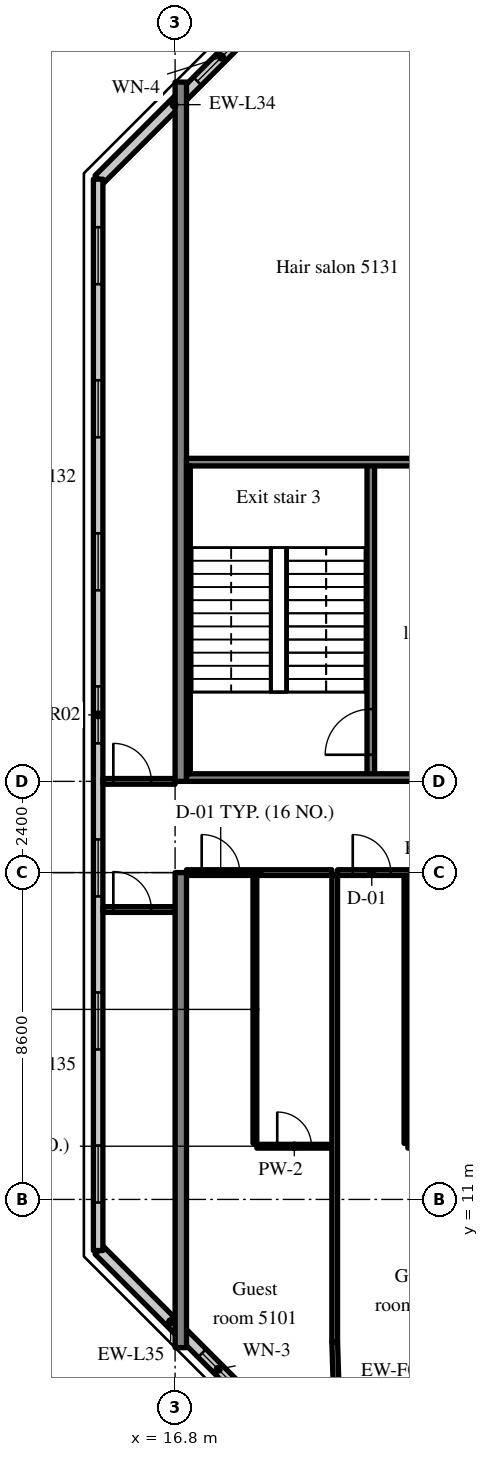
"""IFC4 building model, lengths in metres.
Left out: names, types, materials, properties, quantities, classifications, styles, units other than length and angle.
Written with IfcOpenShell. Run it as: python <this file> out.ifc"""

import sys

from ifc_helpers import new_model, si_unit, direction, frame, frame_2d, origin, place, context, subcontext, project, spatial, rectangle, extrude, source, transform, mapped, element, fill, save


model = new_model("IFC4")
c1 = context("Model", 3, precision=1e-05, world=origin(), true_north=direction((0.0, 1.0)))
c2 = subcontext(c1, "Body", "Model", "MODEL_VIEW")
j1 = project(units=[si_unit("LENGTHUNIT", "METRE"), si_unit("PLANEANGLEUNIT", "RADIAN")], contexts=[c1])
p1 = place(None, origin())
s1 = spatial("IfcSite", under=j1, at=p1, CompositionType="ELEMENT")
p2 = place(p1, origin())
s2 = spatial("IfcBuilding", under=s1, at=p2, CompositionType="ELEMENT")
p3 = place(p2, frame((0.0, 0.0, 214.0)))
s3 = spatial("IfcBuildingStorey", under=s2, at=p3, CompositionType="ELEMENT", Elevation=214.0)
m1 = source(origin(), c2, "Body", "SweptSolid", [
    extrude(rectangle(XDim=12.5, YDim=0.3, at=frame_2d((6.25, 0.0))), origin(), (0.0, 0.0, 1.0), 3.62),
])
p4 = place(p3, frame((16.95, 7.1, 0.0), z_axis=(0.0, 0.0, 1.0), x_axis=(0.0, 1.0, 0.0)))
e1 = element("IfcWall", 1, at=p4, inside=s3, PredefinedType="SHEAR", context=c2, shape_type="MappedRepresentation", body=[
    mapped(m1, transform((0.0, 0.0, 0.0), scale=1.0)),
])
m2 = source(origin(), c2, "Body", "SweptSolid", [
    extrude(rectangle(XDim=18.4, YDim=0.3, at=frame_2d((9.2, 0.0))), origin(), (0.0, 0.0, 1.0), 3.62),
])
p5 = place(p3, frame((16.95, 22.0, 0.0), z_axis=(0.0, 0.0, 1.0), x_axis=(0.0, 1.0, 0.0)))
e2 = element("IfcWall", 2, at=p5, inside=s3, PredefinedType="SHEAR", context=c2, shape_type="MappedRepresentation", body=[
    mapped(m2, transform((0.0, 0.0, 0.0), scale=1.0)),
])
m3 = source(origin(), c2, "Body", "SweptSolid", [
    extrude(rectangle(XDim=5.576, YDim=0.3, at=frame_2d((2.788, 0.0))), origin(), (0.0, 0.0, 1.0), 3.62),
])
p6 = place(p3, frame((18.743, 41.777, 0.0), z_axis=(0.0, 0.0, 1.0), x_axis=(-0.707106781187, -0.707106781187, 0.0)))
e3 = element("IfcWall", 3, at=p6, inside=s3, PredefinedType="SOLIDWALL", context=c2, shape_type="MappedRepresentation", body=[
    mapped(m3, transform((0.0, 0.0, 0.0), scale=1.0)),
])
m4 = source(origin(), c2, "Body", "SweptSolid", [
    extrude(rectangle(XDim=1.8, YDim=1.5, at=frame_2d((0.9, 0.75))), frame((0.0, 0.16, 0.0), z_axis=(0.0, -1.0, 0.0), x_axis=(1.0, 0.0, 0.0)), (0.0, 0.0, 1.0), 0.32),
])
p7 = place(p6, frame((0.118, 0.0, 0.9)))
e4 = element("IfcOpeningElement", 4, at=p7, cuts=e3, PredefinedType="OPENING", context=c2, shape_type="MappedRepresentation", body=[
    mapped(m4, transform((0.0, 0.0, 0.0), scale=1.0)),
])
m5 = source(origin(), c2, "Body", "SweptSolid", [
    extrude(rectangle(XDim=5.326, YDim=0.3, at=frame_2d((2.663, 0.0))), origin(), (0.0, 0.0, 1.0), 3.62),
])
p8 = place(p3, frame((14.8, 9.666, 0.0), z_axis=(0.0, 0.0, 1.0), x_axis=(0.707083859269, -0.707129702361, 0.0)))
e5 = element("IfcWall", 5, at=p8, inside=s3, PredefinedType="SOLIDWALL", context=c2, shape_type="MappedRepresentation", body=[
    mapped(m5, transform((0.0, 0.0, 0.0), scale=1.0)),
])
m6 = source(origin(), c2, "Body", "SweptSolid", [
    extrude(rectangle(XDim=1.2, YDim=1.5, at=frame_2d((0.6, 0.75))), frame((0.0, 0.16, 0.0), z_axis=(0.0, -1.0, 0.0), x_axis=(1.0, 0.0, 0.0)), (0.0, 0.0, 1.0), 0.32),
])
p9 = place(p8, frame((3.833, 0.0, 0.9)))
e6 = element("IfcOpeningElement", 6, at=p9, cuts=e5, PredefinedType="OPENING", context=c2, shape_type="MappedRepresentation", body=[
    mapped(m6, transform((0.0, 0.0, 0.0), scale=1.0)),
])
m7 = source(origin(), c2, "Body", "SweptSolid", [
    extrude(rectangle(XDim=28.189, YDim=0.25, at=frame_2d((14.095, 0.0))), origin(), (0.0, 0.0, 1.0), 3.62),
])
p10 = place(p3, frame((14.775, 37.845, 0.0), z_axis=(0.0, 0.0, 1.0), x_axis=(0.0, -1.0, 0.0)))
e7 = element("IfcWall", 7, at=p10, inside=s3, PredefinedType="SOLIDWALL", context=c2, shape_type="MappedRepresentation", body=[
    mapped(m7, transform((0.0, 0.0, 0.0), scale=1.0)),
])
m8 = source(origin(), c2, "Body", "SweptSolid", [
    extrude(rectangle(XDim=1.5, YDim=1.5, at=frame_2d((0.75, 0.75))), frame((0.0, 0.135, 0.0), z_axis=(0.0, -1.0, 0.0), x_axis=(1.0, 0.0, 0.0)), (0.0, 0.0, 1.0), 0.27),
])
p11 = place(p10, frame((1.263, 0.0, 0.9)))
e8 = element("IfcOpeningElement", 8, at=p11, cuts=e7, PredefinedType="OPENING", context=c2, shape_type="MappedRepresentation", body=[
    mapped(m8, transform((0.0, 0.0, 0.0), scale=1.0)),
])
p12 = place(p10, frame((5.291, 0.0, 0.9)))
e9 = element("IfcOpeningElement", 9, at=p12, cuts=e7, PredefinedType="OPENING", context=c2, shape_type="MappedRepresentation", body=[
    mapped(m8, transform((0.0, 0.0, 0.0), scale=1.0)),
])
p13 = place(p10, frame((9.318, 0.0, 0.9)))
e10 = element("IfcOpeningElement", 10, at=p13, cuts=e7, PredefinedType="OPENING", context=c2, shape_type="MappedRepresentation", body=[
    mapped(m8, transform((0.0, 0.0, 0.0), scale=1.0)),
])
p14 = place(p10, frame((13.345, 0.0, 0.9)))
e11 = element("IfcOpeningElement", 11, at=p14, cuts=e7, PredefinedType="OPENING", context=c2, shape_type="MappedRepresentation", body=[
    mapped(m8, transform((0.0, 0.0, 0.0), scale=1.0)),
])
p15 = place(p10, frame((17.372, 0.0, 0.9)))
e12 = element("IfcOpeningElement", 12, at=p15, cuts=e7, PredefinedType="OPENING", context=c2, shape_type="MappedRepresentation", body=[
    mapped(m8, transform((0.0, 0.0, 0.0), scale=1.0)),
])
p16 = place(p10, frame((21.399, 0.0, 0.9)))
e13 = element("IfcOpeningElement", 13, at=p16, cuts=e7, PredefinedType="OPENING", context=c2, shape_type="MappedRepresentation", body=[
    mapped(m8, transform((0.0, 0.0, 0.0), scale=1.0)),
])
p17 = place(p10, frame((25.426, 0.0, 0.9)))
e14 = element("IfcOpeningElement", 14, at=p17, cuts=e7, PredefinedType="OPENING", context=c2, shape_type="MappedRepresentation", body=[
    mapped(m8, transform((0.0, 0.0, 0.0), scale=1.0)),
])
m9 = source(origin(), c2, "Body", "SweptSolid", [
    extrude(rectangle(XDim=8.3, YDim=0.2, at=frame_2d((4.15, 0.0))), origin(), (0.0, 0.0, 1.0), 3.62),
])
p18 = place(p3, frame((21.95, 22.1, 0.0), z_axis=(0.0, 0.0, 1.0), x_axis=(0.0, 1.0, 0.0)))
e15 = element("IfcWall", 15, at=p18, inside=s3, PredefinedType="SOLIDWALL", context=c2, shape_type="MappedRepresentation", body=[
    mapped(m9, transform((0.0, 0.0, 0.0), scale=1.0)),
])
m10 = source(origin(), c2, "Body", "SweptSolid", [
    extrude(rectangle(XDim=1.2, YDim=2.1, at=frame_2d((0.6, 1.05))), frame((0.0, 0.11, 0.0), z_axis=(0.0, -1.0, 0.0), x_axis=(1.0, 0.0, 0.0)), (0.0, 0.0, 1.0), 0.22),
])
p19 = place(p18, frame((0.6, 0.0, 0.0)))
e16 = element("IfcOpeningElement", 16, at=p19, cuts=e15, PredefinedType="OPENING", context=c2, shape_type="MappedRepresentation", body=[
    mapped(m10, transform((0.0, 0.0, 0.0), scale=1.0)),
])
m11 = source(origin(), c2, "Body", "SweptSolid", [
    extrude(rectangle(XDim=8.1, YDim=0.2, at=frame_2d((4.05, 0.0))), origin(), (0.0, 0.0, 1.0), 3.62),
])
p20 = place(p3, frame((17.1, 22.1, 0.0), z_axis=(0.0, 0.0, 1.0), x_axis=(1.0, 0.0, 0.0)))
e17 = element("IfcWall", 17, at=p20, inside=s3, PredefinedType="SOLIDWALL", context=c2, shape_type="MappedRepresentation", body=[
    mapped(m11, transform((0.0, 0.0, 0.0), scale=1.0)),
])
p21 = place(p20, frame((5.9, 0.0, 0.0)))
e18 = element("IfcOpeningElement", 18, at=p21, cuts=e17, PredefinedType="OPENING", context=c2, shape_type="MappedRepresentation", body=[
    mapped(m10, transform((0.0, 0.0, 0.0), scale=1.0)),
])
p22 = place(p3, frame((17.1, 30.4, 0.0), z_axis=(0.0, 0.0, 1.0), x_axis=(1.0, 0.0, 0.0)))
e19 = element("IfcWall", 19, at=p22, inside=s3, PredefinedType="SOLIDWALL", context=c2, shape_type="MappedRepresentation", body=[
    mapped(m11, transform((0.0, 0.0, 0.0), scale=1.0)),
])
m12 = source(origin(), c2, "Body", "SweptSolid", [
    extrude(rectangle(XDim=1.0, YDim=2.1, at=frame_2d((0.5, 1.05))), frame((0.0, 0.11, 0.0), z_axis=(0.0, -1.0, 0.0), x_axis=(1.0, 0.0, 0.0)), (0.0, 0.0, 1.0), 0.22),
])
p23 = place(p22, frame((6.0, 0.0, 0.0)))
e20 = element("IfcOpeningElement", 20, at=p23, cuts=e19, PredefinedType="OPENING", context=c2, shape_type="MappedRepresentation", body=[
    mapped(m12, transform((0.0, 0.0, 0.0), scale=1.0)),
])
m13 = source(origin(), c2, "Body", "SweptSolid", [
    extrude(rectangle(XDim=8.1, YDim=0.1, at=frame_2d((4.05, 0.0))), origin(), (0.0, 0.0, 1.0), 3.62),
])
p24 = place(p3, frame((17.15, 22.2, 0.0), z_axis=(0.0, 0.0, 1.0), x_axis=(0.0, 1.0, 0.0)))
e21 = element("IfcWall", 21, at=p24, inside=s3, PredefinedType="SOLIDWALL", context=c2, shape_type="MappedRepresentation", body=[
    mapped(m13, transform((0.0, 0.0, 0.0), scale=1.0)),
])
m14 = source(origin(), c2, "Body", "SweptSolid", [
    extrude(rectangle(XDim=7.05, YDim=0.1, at=frame_2d((3.525, 0.0))), origin(), (0.0, 0.0, 1.0), 3.62),
])
p25 = place(p3, frame((18.9, 12.475, 0.0), z_axis=(0.0, 0.0, 1.0), x_axis=(0.0, 1.0, 0.0)))
e22 = element("IfcWall", 22, at=p25, inside=s3, PredefinedType="PARTITIONING", context=c2, shape_type="MappedRepresentation", body=[
    mapped(m14, transform((0.0, 0.0, 0.0), scale=1.0)),
])
m15 = source(origin(), c2, "Body", "SweptSolid", [
    extrude(rectangle(XDim=1.975, YDim=0.1, at=frame_2d((0.988, 0.0))), origin(), (0.0, 0.0, 1.0), 3.62),
])
p26 = place(p3, frame((18.95, 12.4, 0.0), z_axis=(0.0, 0.0, 1.0), x_axis=(1.0, 0.0, 0.0)))
e23 = element("IfcWall", 23, at=p26, inside=s3, PredefinedType="PARTITIONING", context=c2, shape_type="MappedRepresentation", body=[
    mapped(m15, transform((0.0, 0.0, 0.0), scale=1.0)),
])
m16 = source(origin(), c2, "Body", "SweptSolid", [
    extrude(rectangle(XDim=0.9, YDim=2.1, at=frame_2d((0.45, 1.05))), frame((0.0, 0.06, 0.0), z_axis=(0.0, -1.0, 0.0), x_axis=(1.0, 0.0, 0.0)), (0.0, 0.0, 1.0), 0.12),
])
p27 = place(p26, frame((0.538, 0.0, 0.0)))
e24 = element("IfcOpeningElement", 24, at=p27, cuts=e23, PredefinedType="OPENING", context=c2, shape_type="MappedRepresentation", body=[
    mapped(m16, transform((0.0, 0.0, 0.0), scale=1.0)),
])
m17 = source(origin(), c2, "Body", "SweptSolid", [
    extrude(rectangle(XDim=3.825, YDim=0.15, at=frame_2d((1.913, 0.0))), origin(), (0.0, 0.0, 1.0), 2.92),
])
p28 = place(p3, frame((17.1, 19.6, 0.0), z_axis=(0.0, 0.0, 1.0), x_axis=(1.0, 0.0, 0.0)))
e25 = element("IfcWall", 25, at=p28, inside=s3, PredefinedType="PARTITIONING", context=c2, shape_type="MappedRepresentation", body=[
    mapped(m17, transform((0.0, 0.0, 0.0), scale=1.0)),
])
m18 = source(origin(), c2, "Body", "SweptSolid", [
    extrude(rectangle(XDim=1.0, YDim=2.1, at=frame_2d((0.5, 1.05))), frame((0.0, 0.085, 0.0), z_axis=(0.0, -1.0, 0.0), x_axis=(1.0, 0.0, 0.0)), (0.0, 0.0, 1.0), 0.17),
])
p29 = place(p28, frame((0.4, 0.0, 0.0)))
e26 = element("IfcOpeningElement", 26, at=p29, cuts=e25, PredefinedType="OPENING", context=c2, shape_type="MappedRepresentation", body=[
    mapped(m18, transform((0.0, 0.0, 0.0), scale=1.0)),
])
p30 = place(p3, frame((22.875, 12.475, 0.0), z_axis=(0.0, 0.0, 1.0), x_axis=(0.0, 1.0, 0.0)))
e27 = element("IfcWall", 27, at=p30, inside=s3, PredefinedType="PARTITIONING", context=c2, shape_type="MappedRepresentation", body=[
    mapped(m14, transform((0.0, 0.0, 0.0), scale=1.0)),
])
m19 = source(origin(), c2, "Body", "SweptSolid", [
    extrude(rectangle(XDim=2.125, YDim=0.1, at=frame_2d((1.062, 0.0))), origin(), (0.0, 0.0, 1.0), 3.62),
])
p31 = place(p3, frame((22.925, 12.4, 0.0), z_axis=(0.0, 0.0, 1.0), x_axis=(1.0, 0.0, 0.0)))
e28 = element("IfcWall", 28, at=p31, inside=s3, PredefinedType="PARTITIONING", context=c2, shape_type="MappedRepresentation", body=[
    mapped(m19, transform((0.0, 0.0, 0.0), scale=1.0)),
])
p32 = place(p31, frame((0.613, 0.0, 0.0)))
e29 = element("IfcOpeningElement", 29, at=p32, cuts=e28, PredefinedType="OPENING", context=c2, shape_type="MappedRepresentation", body=[
    mapped(m16, transform((0.0, 0.0, 0.0), scale=1.0)),
])
m20 = source(origin(), c2, "Body", "SweptSolid", [
    extrude(rectangle(XDim=3.975, YDim=0.15, at=frame_2d((1.988, 0.0))), origin(), (0.0, 0.0, 1.0), 2.92),
])
p33 = place(p3, frame((21.075, 19.6, 0.0), z_axis=(0.0, 0.0, 1.0), x_axis=(1.0, 0.0, 0.0)))
e30 = element("IfcWall", 30, at=p33, inside=s3, PredefinedType="PARTITIONING", context=c2, shape_type="MappedRepresentation", body=[
    mapped(m20, transform((0.0, 0.0, 0.0), scale=1.0)),
])
p34 = place(p33, frame((0.4, 0.0, 0.0)))
e31 = element("IfcOpeningElement", 31, at=p34, cuts=e30, PredefinedType="OPENING", context=c2, shape_type="MappedRepresentation", body=[
    mapped(m18, transform((0.0, 0.0, 0.0), scale=1.0)),
])
m21 = source(origin(), c2, "Body", "SweptSolid", [
    extrude(rectangle(XDim=12.275, YDim=0.15, at=frame_2d((6.137, 0.0))), origin(), (0.0, 0.0, 1.0), 3.62),
])
p35 = place(p3, frame((21.0, 7.25, 0.0), z_axis=(0.0, 0.0, 1.0), x_axis=(0.0, 1.0, 0.0)))
e32 = element("IfcWall", 32, at=p35, inside=s3, PredefinedType="PARTITIONING", context=c2, shape_type="MappedRepresentation", body=[
    mapped(m21, transform((0.0, 0.0, 0.0), scale=1.0)),
])
m22 = source(origin(), c2, "Body", "SweptSolid", [
    extrude(rectangle(XDim=1.9, YDim=0.15, at=frame_2d((0.95, 0.0))), origin(), (0.0, 0.0, 1.0), 2.92),
])
p36 = place(p3, frame((14.9, 22.0, 0.0), z_axis=(0.0, 0.0, 1.0), x_axis=(1.0, 0.0, 0.0)))
e33 = element("IfcWall", 33, at=p36, inside=s3, PredefinedType="PARTITIONING", context=c2, shape_type="MappedRepresentation", body=[
    mapped(m22, transform((0.0, 0.0, 0.0), scale=1.0)),
])
p37 = place(p36, frame((0.275, 0.0, 0.0)))
e34 = element("IfcOpeningElement", 34, at=p37, cuts=e33, PredefinedType="OPENING", context=c2, shape_type="MappedRepresentation", body=[
    mapped(m18, transform((0.0, 0.0, 0.0), scale=1.0)),
])
p38 = place(p3, frame((14.9, 18.628, 0.0), z_axis=(0.0, 0.0, 1.0), x_axis=(1.0, 0.0, 0.0)))
e35 = element("IfcWall", 35, at=p38, inside=s3, PredefinedType="PARTITIONING", context=c2, shape_type="MappedRepresentation", body=[
    mapped(m22, transform((0.0, 0.0, 0.0), scale=1.0)),
])
p39 = place(p38, frame((0.275, 0.0, 0.0)))
e36 = element("IfcOpeningElement", 36, at=p39, cuts=e35, PredefinedType="OPENING", context=c2, shape_type="MappedRepresentation", body=[
    mapped(m18, transform((0.0, 0.0, 0.0), scale=1.0)),
])
m23 = source(origin(), c2, "Body", "SweptSolid", [
    extrude(rectangle(XDim=1.301, YDim=0.15, at=frame_2d((0.65, 0.0))), origin(), (0.0, 0.0, 1.0), 3.62),
])
p40 = place(p3, frame((21.041, 5.95, 0.0), z_axis=(0.0, 0.0, 1.0), x_axis=(-0.031533606063, 0.999502692187, 0.0)))
e37 = element("IfcWall", 37, at=p40, inside=s3, PredefinedType="PARTITIONING", context=c2, shape_type="MappedRepresentation", body=[
    mapped(m23, transform((0.0, 0.0, 0.0), scale=1.0)),
])
m24 = source(origin(), c2, "Body", "SweptSolid", [
    extrude(rectangle(XDim=1.8, YDim=1.5, at=frame_2d((0.9, 0.75))), frame((0.0, 0.03, 0.0), z_axis=(0.0, -1.0, 0.0), x_axis=(1.0, 0.0, 0.0)), (0.0, 0.0, 1.0), 0.06),
])
p41 = place(p7, origin())
e38 = element("IfcWindow", 38, at=p41, inside=s3, PartitioningType="SINGLE_PANEL", PredefinedType="WINDOW", context=c2, shape_type="MappedRepresentation", body=[
    mapped(m24, transform((0.0, 0.0, 0.0), scale=1.0)),
])
fill(e4, e38)
m25 = source(origin(), c2, "Body", "SweptSolid", [
    extrude(rectangle(XDim=1.2, YDim=1.5, at=frame_2d((0.6, 0.75))), frame((0.0, 0.03, 0.0), z_axis=(0.0, -1.0, 0.0), x_axis=(1.0, 0.0, 0.0)), (0.0, 0.0, 1.0), 0.06),
])
p42 = place(p9, origin())
e39 = element("IfcWindow", 39, at=p42, inside=s3, PartitioningType="SINGLE_PANEL", PredefinedType="WINDOW", context=c2, shape_type="MappedRepresentation", body=[
    mapped(m25, transform((0.0, 0.0, 0.0), scale=1.0)),
])
fill(e6, e39)
m26 = source(origin(), c2, "Body", "SweptSolid", [
    extrude(rectangle(XDim=1.5, YDim=1.5, at=frame_2d((0.75, 0.75))), frame((0.0, 0.03, 0.0), z_axis=(0.0, -1.0, 0.0), x_axis=(1.0, 0.0, 0.0)), (0.0, 0.0, 1.0), 0.06),
])
p43 = place(p11, origin())
e40 = element("IfcWindow", 40, at=p43, inside=s3, PartitioningType="SINGLE_PANEL", PredefinedType="WINDOW", context=c2, shape_type="MappedRepresentation", body=[
    mapped(m26, transform((0.0, 0.0, 0.0), scale=1.0)),
])
fill(e8, e40)
p44 = place(p12, origin())
e41 = element("IfcWindow", 41, at=p44, inside=s3, PartitioningType="SINGLE_PANEL", PredefinedType="WINDOW", context=c2, shape_type="MappedRepresentation", body=[
    mapped(m26, transform((0.0, 0.0, 0.0), scale=1.0)),
])
fill(e9, e41)
p45 = place(p13, origin())
e42 = element("IfcWindow", 42, at=p45, inside=s3, PartitioningType="SINGLE_PANEL", PredefinedType="WINDOW", context=c2, shape_type="MappedRepresentation", body=[
    mapped(m26, transform((0.0, 0.0, 0.0), scale=1.0)),
])
fill(e10, e42)
p46 = place(p14, origin())
e43 = element("IfcWindow", 43, at=p46, inside=s3, PartitioningType="SINGLE_PANEL", PredefinedType="WINDOW", context=c2, shape_type="MappedRepresentation", body=[
    mapped(m26, transform((0.0, 0.0, 0.0), scale=1.0)),
])
fill(e11, e43)
p47 = place(p15, origin())
e44 = element("IfcWindow", 44, at=p47, inside=s3, PartitioningType="SINGLE_PANEL", PredefinedType="WINDOW", context=c2, shape_type="MappedRepresentation", body=[
    mapped(m26, transform((0.0, 0.0, 0.0), scale=1.0)),
])
fill(e12, e44)
p48 = place(p16, origin())
e45 = element("IfcWindow", 45, at=p48, inside=s3, PartitioningType="SINGLE_PANEL", PredefinedType="WINDOW", context=c2, shape_type="MappedRepresentation", body=[
    mapped(m26, transform((0.0, 0.0, 0.0), scale=1.0)),
])
fill(e13, e45)
p49 = place(p17, origin())
e46 = element("IfcWindow", 46, at=p49, inside=s3, PartitioningType="SINGLE_PANEL", PredefinedType="WINDOW", context=c2, shape_type="MappedRepresentation", body=[
    mapped(m26, transform((0.0, 0.0, 0.0), scale=1.0)),
])
fill(e14, e46)
m27 = source(origin(), c2, "Body", "SweptSolid", [
    extrude(rectangle(XDim=1.2, YDim=2.1, at=frame_2d((0.6, 1.05))), frame((0.0, 0.025, 0.0), z_axis=(0.0, -1.0, 0.0), x_axis=(1.0, 0.0, 0.0)), (0.0, 0.0, 1.0), 0.05),
])
p50 = place(p19, origin())
e47 = element("IfcDoor", 47, at=p50, inside=s3, OperationType="SINGLE_SWING_LEFT", PredefinedType="DOOR", context=c2, shape_type="MappedRepresentation", body=[
    mapped(m27, transform((0.0, 0.0, 0.0), scale=1.0)),
])
fill(e16, e47)
m28 = source(origin(), c2, "Body", "SweptSolid", [
    extrude(rectangle(XDim=0.9, YDim=2.1, at=frame_2d((0.45, 1.05))), frame((0.0, 0.025, 0.0), z_axis=(0.0, -1.0, 0.0), x_axis=(1.0, 0.0, 0.0)), (0.0, 0.0, 1.0), 0.05),
])
p51 = place(p27, origin())
e48 = element("IfcDoor", 48, at=p51, inside=s3, OperationType="SINGLE_SWING_LEFT", PredefinedType="DOOR", context=c2, shape_type="MappedRepresentation", body=[
    mapped(m28, transform((0.0, 0.0, 0.0), scale=1.0)),
])
fill(e24, e48)
m29 = source(origin(), c2, "Body", "SweptSolid", [
    extrude(rectangle(XDim=1.0, YDim=2.1, at=frame_2d((0.5, 1.05))), frame((0.0, 0.025, 0.0), z_axis=(0.0, -1.0, 0.0), x_axis=(1.0, 0.0, 0.0)), (0.0, 0.0, 1.0), 0.05),
])
p52 = place(p29, origin())
e49 = element("IfcDoor", 49, at=p52, inside=s3, OperationType="SINGLE_SWING_LEFT", PredefinedType="DOOR", context=c2, shape_type="MappedRepresentation", body=[
    mapped(m29, transform((0.0, 0.0, 0.0), scale=1.0)),
])
fill(e26, e49)
p53 = place(p34, origin())
e50 = element("IfcDoor", 50, at=p53, inside=s3, OperationType="SINGLE_SWING_LEFT", PredefinedType="DOOR", context=c2, shape_type="MappedRepresentation", body=[
    mapped(m29, transform((0.0, 0.0, 0.0), scale=1.0)),
])
fill(e31, e50)
p54 = place(p37, origin())
e51 = element("IfcDoor", 51, at=p54, inside=s3, OperationType="SINGLE_SWING_LEFT", PredefinedType="DOOR", context=c2, shape_type="MappedRepresentation", body=[
    mapped(m29, transform((0.0, 0.0, 0.0), scale=1.0)),
])
fill(e34, e51)
p55 = place(p39, origin())
e52 = element("IfcDoor", 52, at=p55, inside=s3, OperationType="SINGLE_SWING_LEFT", PredefinedType="DOOR", context=c2, shape_type="MappedRepresentation", body=[
    mapped(m29, transform((0.0, 0.0, 0.0), scale=1.0)),
])
fill(e36, e52)
save(model, sys.argv[1])
